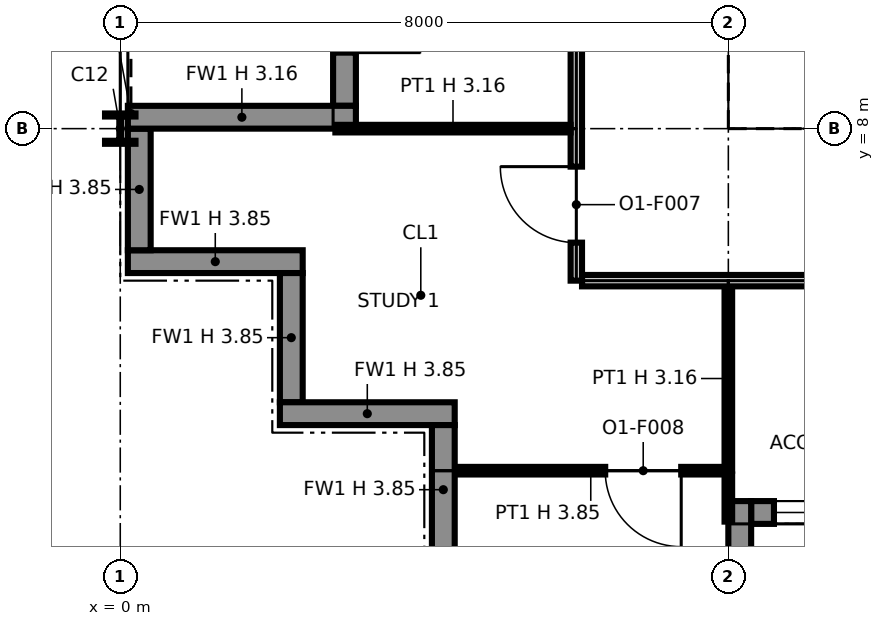
"""IFC4 building model, lengths in metres.
Left out: names, types, materials, properties, quantities, classifications, styles, units other than length and angle.
Written with IfcOpenShell. Run it as: python <this file> out.ifc"""

import sys

from ifc_helpers import new_model, si_unit, direction, frame, frame_2d, origin, origin_2d, place, context, subcontext, project, spatial, polyline, rectangle, i_section, outline, extrude, element, fill, save


model = new_model("IFC4")
c1 = context("Model", 3, precision=1e-05, world=origin(), true_north=direction((0.0, 1.0)))
c2 = subcontext(c1, "Body", "Model", "MODEL_VIEW")
j1 = project(units=[si_unit("LENGTHUNIT", "METRE"), si_unit("PLANEANGLEUNIT", "RADIAN")], contexts=[c1])
p1 = place(None, origin())
s1 = spatial("IfcSite", under=j1, at=p1, CompositionType="ELEMENT")
p2 = place(p1, origin())
s2 = spatial("IfcBuilding", under=s1, at=p2, CompositionType="ELEMENT")
p3 = place(p2, frame((0.0, 0.0, 197.0)))
s3 = spatial("IfcBuildingStorey", under=s2, at=p3, CompositionType="ELEMENT", Elevation=197.0)
p4 = place(p3, frame((0.0, 8.0, 0.0), z_axis=(0.0, 0.0, 1.0), x_axis=(1.0, 0.0, 0.0)))
e1 = element("IfcColumn", 1, at=p4, inside=s3, PredefinedType="COLUMN", context=c2, shape_type="SweptSolid", body=[
    extrude(i_section(OverallWidth=0.401, OverallDepth=0.399, WebThickness=0.025, FlangeThickness=0.04, at=origin_2d()), origin(), (0.0, 0.0, 1.0), 3.85),
])
p5 = place(p3, frame((8.0, 8.0, 0.0), z_axis=(0.0, 0.0, 1.0), x_axis=(1.0, 0.0, 0.0)))
e2 = element("IfcColumn", 2, at=p5, inside=s3, PredefinedType="COLUMN", context=c2, shape_type="SweptSolid", body=[
    extrude(i_section(OverallWidth=0.394, OverallDepth=0.376, WebThickness=0.017, FlangeThickness=0.028, at=origin_2d()), origin(), (0.0, 0.0, 1.0), 3.85),
])
p6 = place(p3, frame((0.1, 6.25, 0.0), z_axis=(0.0, 0.0, 1.0), x_axis=(1.0, 0.0, 0.0)))
e3 = element("IfcWall", 3, at=p6, inside=s3, PredefinedType="SOLIDWALL", context=c2, shape_type="SweptSolid", body=[
    extrude(rectangle(XDim=2.3, YDim=0.3, at=frame_2d((1.15, 0.0))), origin(), (0.0, 0.0, 1.0), 3.85),
])
p7 = place(p3, frame((2.25, 6.1, 0.0), z_axis=(0.0, 0.0, 1.0), x_axis=(0.0, -1.0, 0.0)))
e4 = element("IfcWall", 4, at=p7, inside=s3, PredefinedType="SOLIDWALL", context=c2, shape_type="SweptSolid", body=[
    extrude(rectangle(XDim=1.7, YDim=0.3, at=frame_2d((0.85, 0.0))), origin(), (0.0, 0.0, 1.0), 3.85),
])
p8 = place(p3, frame((2.1, 4.25, 0.0), z_axis=(0.0, 0.0, 1.0), x_axis=(1.0, 0.0, 0.0)))
e5 = element("IfcWall", 5, at=p8, inside=s3, PredefinedType="SOLIDWALL", context=c2, shape_type="SweptSolid", body=[
    extrude(rectangle(XDim=2.3, YDim=0.3, at=frame_2d((1.15, 0.0))), origin(), (0.0, 0.0, 1.0), 3.85),
])
p9 = place(p3, frame((4.25, 4.1, 0.0), z_axis=(0.0, 0.0, 1.0), x_axis=(0.0, -1.0, 0.0)))
e6 = element("IfcWall", 6, at=p9, inside=s3, PredefinedType="SOLIDWALL", context=c2, shape_type="SweptSolid", body=[
    extrude(rectangle(XDim=1.7, YDim=0.3, at=frame_2d((0.85, 0.0))), origin(), (0.0, 0.0, 1.0), 3.85),
])
p10 = place(p3, frame((8.3, 2.95, 0.0), z_axis=(0.0, 0.0, 1.0), x_axis=(1.0, 0.0, 0.0)))
e7 = element("IfcWall", 7, at=p10, inside=s3, PredefinedType="SOLIDWALL", context=c2, shape_type="SweptSolid", body=[
    extrude(rectangle(XDim=7.4, YDim=0.3, at=frame_2d((3.7, 0.0))), origin(), (0.0, 0.0, 1.0), 3.85),
])
p11 = place(p10, frame((0.3, 0.0, 0.9)))
e8 = element("IfcOpeningElement", 8, at=p11, cuts=e7, PredefinedType="OPENING", context=c2, shape_type="SweptSolid", body=[
    extrude(rectangle(XDim=2.8, YDim=2.2, at=frame_2d((1.4, 1.1))), frame((0.0, 0.16, 0.0), z_axis=(0.0, -1.0, 0.0), x_axis=(1.0, 0.0, 0.0)), (0.0, 0.0, 1.0), 0.32),
])
p12 = place(p10, frame((4.7, 0.0, 0.0)))
e9 = element("IfcOpeningElement", 9, at=p12, cuts=e7, PredefinedType="OPENING", context=c2, shape_type="SweptSolid", body=[
    extrude(rectangle(XDim=2.0, YDim=2.4, at=frame_2d((1.0, 1.2))), frame((0.0, 0.16, 0.0), z_axis=(0.0, -1.0, 0.0), x_axis=(1.0, 0.0, 0.0)), (0.0, 0.0, 1.0), 0.32),
])
p13 = place(p3, frame((8.15, 0.1, 0.0), z_axis=(0.0, 0.0, 1.0), x_axis=(0.0, 1.0, 0.0)))
e10 = element("IfcWall", 10, at=p13, inside=s3, PredefinedType="SOLIDWALL", context=c2, shape_type="SweptSolid", body=[
    extrude(rectangle(XDim=3.0, YDim=0.3, at=frame_2d((1.5, 0.0))), origin(), (0.0, 0.0, 1.0), 3.156),
])
p14 = place(p3, frame((2.95, 15.7, 0.0), z_axis=(0.0, 0.0, 1.0), x_axis=(0.0, -1.0, 0.0)))
e11 = element("IfcWall", 11, at=p14, inside=s3, PredefinedType="SOLIDWALL", context=c2, shape_type="SweptSolid", body=[
    extrude(rectangle(XDim=7.4, YDim=0.3, at=frame_2d((3.7, 0.0))), origin(), (0.0, 0.0, 1.0), 3.85),
])
p15 = place(p14, frame((0.3, 0.0, 0.9)))
e12 = element("IfcOpeningElement", 12, at=p15, cuts=e11, PredefinedType="OPENING", context=c2, shape_type="SweptSolid", body=[
    extrude(rectangle(XDim=2.8, YDim=2.2, at=frame_2d((1.4, 1.1))), frame((0.0, 0.16, 0.0), z_axis=(0.0, -1.0, 0.0), x_axis=(1.0, 0.0, 0.0)), (0.0, 0.0, 1.0), 0.32),
])
p16 = place(p14, frame((4.7, 0.0, 0.0)))
e13 = element("IfcOpeningElement", 13, at=p16, cuts=e11, PredefinedType="OPENING", context=c2, shape_type="SweptSolid", body=[
    extrude(rectangle(XDim=2.0, YDim=2.4, at=frame_2d((1.0, 1.2))), frame((0.0, 0.16, 0.0), z_axis=(0.0, -1.0, 0.0), x_axis=(1.0, 0.0, 0.0)), (0.0, 0.0, 1.0), 0.32),
])
p17 = place(p3, frame((0.1, 8.15, 0.0), z_axis=(0.0, 0.0, 1.0), x_axis=(1.0, 0.0, 0.0)))
e14 = element("IfcWall", 14, at=p17, inside=s3, PredefinedType="SOLIDWALL", context=c2, shape_type="SweptSolid", body=[
    extrude(rectangle(XDim=3.0, YDim=0.3, at=frame_2d((1.5, 0.0))), origin(), (0.0, 0.0, 1.0), 3.156),
])
p18 = place(p3, frame((0.25, 8.0, 0.0), z_axis=(0.0, 0.0, 1.0), x_axis=(0.0, -1.0, 0.0)))
e15 = element("IfcWall", 15, at=p18, inside=s3, PredefinedType="SOLIDWALL", context=c2, shape_type="SweptSolid", body=[
    extrude(rectangle(XDim=1.6, YDim=0.3, at=frame_2d((0.8, 0.0))), origin(), (0.0, 0.0, 1.0), 3.85),
])
p19 = place(p3, frame((8.65, 8.75, 0.0), z_axis=(0.0, 0.0, 1.0), x_axis=(1.0, 0.0, 0.0)))
e16 = element("IfcWall", 16, at=p19, inside=s3, PredefinedType="PARTITIONING", context=c2, shape_type="SweptSolid", body=[
    extrude(outline(polyline([(0.0, 0.0), (14.7, 0.0), (14.7, 3.85), (7.469, 3.85), (7.468, 3.242), (7.232, 3.242), (7.231, 3.85), (0.0, 3.85), (0.0, 0.0)])), frame((0.0, 0.1, 0.0), z_axis=(0.0, -1.0, 0.0), x_axis=(1.0, 0.0, 0.0)), (0.0, 0.0, 1.0), 0.2),
])
p20 = place(p19, frame((1.3, 0.0, 0.0)))
e17 = element("IfcOpeningElement", 17, at=p20, cuts=e16, PredefinedType="OPENING", context=c2, shape_type="SweptSolid", body=[
    extrude(rectangle(XDim=1.4, YDim=2.1, at=frame_2d((0.7, 1.05))), frame((0.0, 0.11, 0.0), z_axis=(0.0, -1.0, 0.0), x_axis=(1.0, 0.0, 0.0)), (0.0, 0.0, 1.0), 0.22),
])
p21 = place(p19, frame((4.6, 0.0, 0.0)))
e18 = element("IfcOpeningElement", 18, at=p21, cuts=e16, PredefinedType="OPENING", context=c2, shape_type="SweptSolid", body=[
    extrude(rectangle(XDim=1.4, YDim=2.1, at=frame_2d((0.7, 1.05))), frame((0.0, 0.11, 0.0), z_axis=(0.0, -1.0, 0.0), x_axis=(1.0, 0.0, 0.0)), (0.0, 0.0, 1.0), 0.22),
])
p22 = place(p19, frame((10.4, 0.0, 0.0)))
e19 = element("IfcOpeningElement", 19, at=p22, cuts=e16, PredefinedType="OPENING", context=c2, shape_type="SweptSolid", body=[
    extrude(rectangle(XDim=1.2, YDim=2.1, at=frame_2d((0.6, 1.05))), frame((0.0, 0.11, 0.0), z_axis=(0.0, -1.0, 0.0), x_axis=(1.0, 0.0, 0.0)), (0.0, 0.0, 1.0), 0.22),
])
p23 = place(p3, frame((8.75, 8.85, 0.0), z_axis=(0.0, 0.0, 1.0), x_axis=(0.0, 1.0, 0.0)))
e20 = element("IfcWall", 20, at=p23, inside=s3, PredefinedType="PARTITIONING", context=c2, shape_type="SweptSolid", body=[
    extrude(outline(polyline([(0.0, 0.0), (14.3, 0.0), (14.3, 3.85), (10.231, 3.85), (10.23, 3.389), (10.07, 3.389), (10.069, 3.85), (7.269, 3.85), (7.268, 3.242), (7.032, 3.242), (7.031, 3.85), (0.0, 3.85), (0.0, 0.0)])), frame((0.0, 0.1, 0.0), z_axis=(0.0, -1.0, 0.0), x_axis=(1.0, 0.0, 0.0)), (0.0, 0.0, 1.0), 0.2),
])
p24 = place(p23, frame((8.3, 0.0, 0.0)))
e21 = element("IfcOpeningElement", 21, at=p24, cuts=e20, PredefinedType="OPENING", context=c2, shape_type="SweptSolid", body=[
    extrude(rectangle(XDim=1.8, YDim=2.1, at=frame_2d((0.9, 1.05))), frame((0.0, 0.11, 0.0), z_axis=(0.0, -1.0, 0.0), x_axis=(1.0, 0.0, 0.0)), (0.0, 0.0, 1.0), 0.22),
])
p25 = place(p3, frame((8.0, 2.83, 0.0), z_axis=(0.0, 0.0, 1.0), x_axis=(0.0, 1.0, 0.0)))
e22 = element("IfcWall", 22, at=p25, inside=s3, PredefinedType="PARTITIONING", context=c2, shape_type="SweptSolid", body=[
    extrude(rectangle(XDim=0.62, YDim=0.1, at=frame_2d((0.31, 0.0))), origin(), (0.0, 0.0, 1.0), 3.157),
])
p26 = place(p3, frame((4.43, 3.5, 0.0), z_axis=(0.0, 0.0, 1.0), x_axis=(1.0, 0.0, 0.0)))
e23 = element("IfcWall", 23, at=p26, inside=s3, PredefinedType="PARTITIONING", context=c2, shape_type="SweptSolid", body=[
    extrude(rectangle(XDim=3.52, YDim=0.1, at=frame_2d((1.76, 0.0))), origin(), (0.0, 0.0, 1.0), 3.85),
])
p27 = place(p26, frame((2.95, 0.0, 0.0), z_axis=(0.0, 0.0, 1.0), x_axis=(-1.0, 0.0, 0.0)))
e24 = element("IfcOpeningElement", 24, at=p27, cuts=e23, PredefinedType="OPENING", context=c2, shape_type="SweptSolid", body=[
    extrude(rectangle(XDim=1.0, YDim=2.1, at=frame_2d((0.5, 1.05))), frame((0.0, 0.06, 0.0), z_axis=(0.0, -1.0, 0.0), x_axis=(1.0, 0.0, 0.0)), (0.0, 0.0, 1.0), 0.12),
])
p28 = place(p3, frame((8.0, 3.5, 0.0), z_axis=(0.0, 0.0, 1.0), x_axis=(0.0, 1.0, 0.0)))
e25 = element("IfcWall", 25, at=p28, inside=s3, PredefinedType="PARTITIONING", context=c2, shape_type="SweptSolid", body=[
    extrude(rectangle(XDim=2.425, YDim=0.1, at=frame_2d((1.212, 0.0))), origin(), (0.0, 0.0, 1.0), 3.157),
])
p29 = place(p3, frame((6.075, 6.0, 0.0), z_axis=(0.0, 0.0, 1.0), x_axis=(1.0, 0.0, 0.0)))
e26 = element("IfcWall", 26, at=p29, inside=s3, PredefinedType="PARTITIONING", context=c2, shape_type="SweptSolid", body=[
    extrude(rectangle(XDim=19.85, YDim=0.15, at=frame_2d((9.925, 0.0))), origin(), (0.0, 0.0, 1.0), 3.85),
])
p30 = place(p29, frame((12.425, 0.0, 0.0), z_axis=(0.0, 0.0, 1.0), x_axis=(-1.0, 0.0, 0.0)))
e27 = element("IfcOpeningElement", 27, at=p30, cuts=e26, PredefinedType="OPENING", context=c2, shape_type="SweptSolid", body=[
    extrude(rectangle(XDim=1.0, YDim=2.1, at=frame_2d((0.5, 1.05))), frame((0.0, 0.085, 0.0), z_axis=(0.0, -1.0, 0.0), x_axis=(1.0, 0.0, 0.0)), (0.0, 0.0, 1.0), 0.17),
])
p31 = place(p29, frame((16.425, 0.0, 0.0), z_axis=(0.0, 0.0, 1.0), x_axis=(-1.0, 0.0, 0.0)))
e28 = element("IfcOpeningElement", 28, at=p31, cuts=e26, PredefinedType="OPENING", context=c2, shape_type="SweptSolid", body=[
    extrude(rectangle(XDim=1.0, YDim=2.1, at=frame_2d((0.5, 1.05))), frame((0.0, 0.085, 0.0), z_axis=(0.0, -1.0, 0.0), x_axis=(1.0, 0.0, 0.0)), (0.0, 0.0, 1.0), 0.17),
])
p32 = place(p29, frame((4.425, 0.0, 0.0), z_axis=(0.0, 0.0, 1.0), x_axis=(-1.0, 0.0, 0.0)))
e29 = element("IfcOpeningElement", 29, at=p32, cuts=e26, PredefinedType="OPENING", context=c2, shape_type="SweptSolid", body=[
    extrude(rectangle(XDim=1.0, YDim=2.1, at=frame_2d((0.5, 1.05))), frame((0.0, 0.085, 0.0), z_axis=(0.0, -1.0, 0.0), x_axis=(1.0, 0.0, 0.0)), (0.0, 0.0, 1.0), 0.17),
])
p33 = place(p29, frame((8.425, 0.0, 0.0), z_axis=(0.0, 0.0, 1.0), x_axis=(-1.0, 0.0, 0.0)))
e30 = element("IfcOpeningElement", 30, at=p33, cuts=e26, PredefinedType="OPENING", context=c2, shape_type="SweptSolid", body=[
    extrude(rectangle(XDim=1.0, YDim=2.1, at=frame_2d((0.5, 1.05))), frame((0.0, 0.085, 0.0), z_axis=(0.0, -1.0, 0.0), x_axis=(1.0, 0.0, 0.0)), (0.0, 0.0, 1.0), 0.17),
])
p34 = place(p3, frame((6.0, 6.0, 0.0), z_axis=(0.0, 0.0, 1.0), x_axis=(0.0, 1.0, 0.0)))
e31 = element("IfcWall", 31, at=p34, inside=s3, PredefinedType="PARTITIONING", context=c2, shape_type="SweptSolid", body=[
    extrude(outline(polyline([(0.0, 0.0), (15.87, 0.0), (15.87, 3.85), (14.3, 3.85), (14.298, 3.157), (13.702, 3.157), (13.7, 3.85), (10.3, 3.85), (10.298, 3.157), (9.702, 3.157), (9.7, 3.85), (6.3, 3.85), (6.298, 3.157), (5.702, 3.157), (5.7, 3.85), (2.3, 3.85), (2.298, 3.157), (1.702, 3.157), (1.7, 3.85), (0.0, 3.85), (0.0, 0.0)])), frame((0.0, 0.075, 0.0), z_axis=(0.0, -1.0, 0.0), x_axis=(1.0, 0.0, 0.0)), (0.0, 0.0, 1.0), 0.15),
])
p35 = place(p34, frame((0.5, 0.0, 0.0)))
e32 = element("IfcOpeningElement", 32, at=p35, cuts=e31, PredefinedType="OPENING", context=c2, shape_type="SweptSolid", body=[
    extrude(rectangle(XDim=1.0, YDim=2.1, at=frame_2d((0.5, 1.05))), frame((0.0, 0.085, 0.0), z_axis=(0.0, -1.0, 0.0), x_axis=(1.0, 0.0, 0.0)), (0.0, 0.0, 1.0), 0.17),
])
p36 = place(p34, frame((3.5, 0.0, 0.0)))
e33 = element("IfcOpeningElement", 33, at=p36, cuts=e31, PredefinedType="OPENING", context=c2, shape_type="SweptSolid", body=[
    extrude(rectangle(XDim=1.0, YDim=2.1, at=frame_2d((0.5, 1.05))), frame((0.0, 0.085, 0.0), z_axis=(0.0, -1.0, 0.0), x_axis=(1.0, 0.0, 0.0)), (0.0, 0.0, 1.0), 0.17),
])
p37 = place(p34, frame((7.5, 0.0, 0.0)))
e34 = element("IfcOpeningElement", 34, at=p37, cuts=e31, PredefinedType="OPENING", context=c2, shape_type="SweptSolid", body=[
    extrude(rectangle(XDim=1.0, YDim=2.1, at=frame_2d((0.5, 1.05))), frame((0.0, 0.085, 0.0), z_axis=(0.0, -1.0, 0.0), x_axis=(1.0, 0.0, 0.0)), (0.0, 0.0, 1.0), 0.17),
])
p38 = place(p34, frame((11.225, 0.0, 0.0)))
e35 = element("IfcOpeningElement", 35, at=p38, cuts=e31, PredefinedType="OPENING", context=c2, shape_type="SweptSolid", body=[
    extrude(rectangle(XDim=1.0, YDim=2.1, at=frame_2d((0.5, 1.05))), frame((0.0, 0.085, 0.0), z_axis=(0.0, -1.0, 0.0), x_axis=(1.0, 0.0, 0.0)), (0.0, 0.0, 1.0), 0.17),
])
p39 = place(p3, frame((2.83, 8.0, 0.0), z_axis=(0.0, 0.0, 1.0), x_axis=(1.0, 0.0, 0.0)))
e36 = element("IfcWall", 36, at=p39, inside=s3, PredefinedType="PARTITIONING", context=c2, shape_type="SweptSolid", body=[
    extrude(rectangle(XDim=3.095, YDim=0.1, at=frame_2d((1.547, 0.0))), origin(), (0.0, 0.0, 1.0), 3.157),
])
p40 = place(p11, origin())
e37 = element("IfcWindow", 37, at=p40, inside=s3, PartitioningType="SINGLE_PANEL", PredefinedType="WINDOW", context=c2, shape_type="SweptSolid", body=[
    extrude(rectangle(XDim=2.8, YDim=2.2, at=frame_2d((1.4, 1.1))), frame((0.0, 0.03, 0.0), z_axis=(0.0, -1.0, 0.0), x_axis=(1.0, 0.0, 0.0)), (0.0, 0.0, 1.0), 0.06),
])
fill(e8, e37)
p41 = place(p35, origin())
e38 = element("IfcDoor", 38, at=p41, inside=s3, OperationType="SINGLE_SWING_RIGHT", PredefinedType="DOOR", context=c2, shape_type="SweptSolid", body=[
    extrude(rectangle(XDim=1.0, YDim=2.1, at=frame_2d((0.5, 1.05))), frame((0.0, 0.025, 0.0), z_axis=(0.0, -1.0, 0.0), x_axis=(1.0, 0.0, 0.0)), (0.0, 0.0, 1.0), 0.05),
])
fill(e32, e38)
p42 = place(p27, origin())
e39 = element("IfcDoor", 39, at=p42, inside=s3, OperationType="SINGLE_SWING_LEFT", PredefinedType="DOOR", context=c2, shape_type="SweptSolid", body=[
    extrude(rectangle(XDim=1.0, YDim=2.1, at=frame_2d((0.5, 1.05))), frame((0.0, 0.025, 0.0), z_axis=(0.0, -1.0, 0.0), x_axis=(1.0, 0.0, 0.0)), (0.0, 0.0, 1.0), 0.05),
])
fill(e24, e39)
save(model, sys.argv[1])
